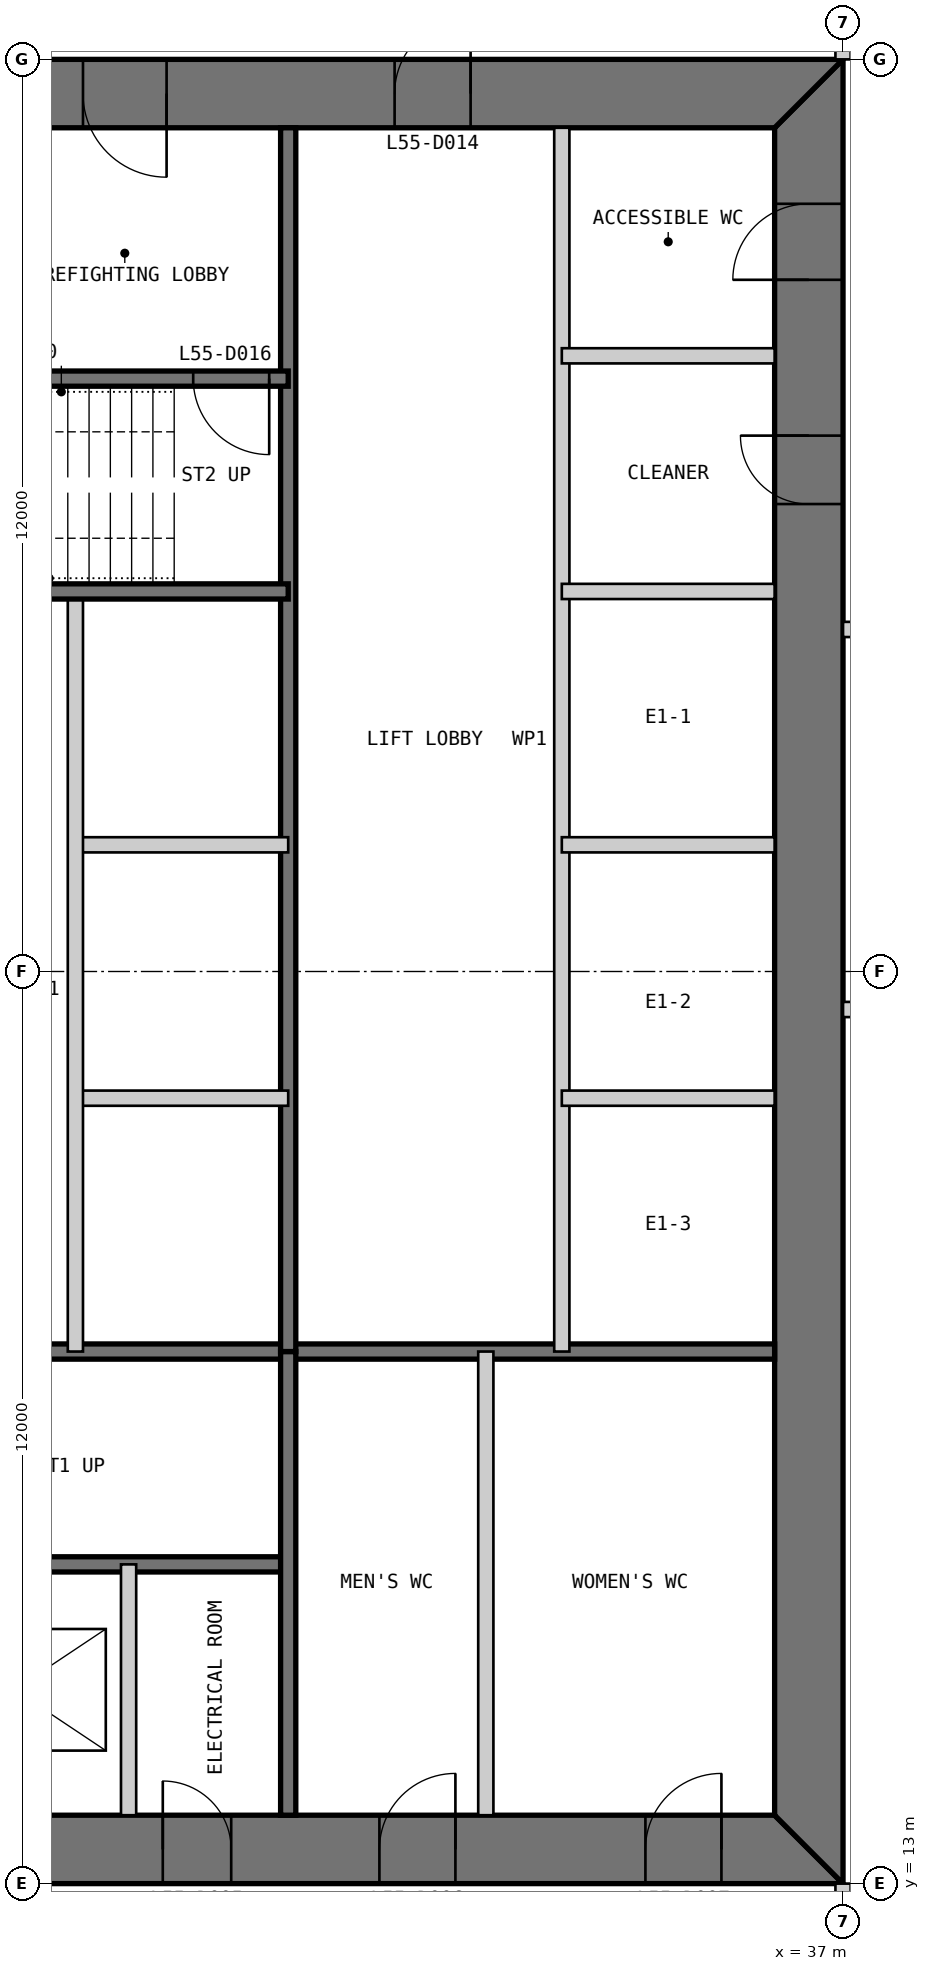
"""IFC4 building model, lengths in metres.
Left out: names, types, materials, properties, quantities, classifications, styles, units other than length and angle.
Written with IfcOpenShell. Run it as: python <this file> out.ifc"""

import sys

from ifc_helpers import new_model, si_unit, direction, frame, frame_2d, origin, place, context, subcontext, project, spatial, polyline, rectangle, outline, extrude, element, fill, save


model = new_model("IFC4")
c1 = context("Model", 3, precision=1e-05, world=origin(), true_north=direction((0.0, 1.0)))
c2 = subcontext(c1, "Body", "Model", "MODEL_VIEW")
j1 = project(units=[si_unit("LENGTHUNIT", "METRE"), si_unit("PLANEANGLEUNIT", "RADIAN")], contexts=[c1])
p1 = place(None, origin())
s1 = spatial("IfcSite", under=j1, at=p1, CompositionType="ELEMENT")
p2 = place(p1, origin())
s2 = spatial("IfcBuilding", under=s1, at=p2, CompositionType="ELEMENT")
p3 = place(p2, frame((0.0, 0.0, 233.8)))
s3 = spatial("IfcBuildingStorey", under=s2, at=p3, CompositionType="ELEMENT", Elevation=233.8)
p4 = place(p3, frame((13.0, 13.45, 0.0), z_axis=(0.0, 0.0, 1.0), x_axis=(1.0, 0.0, 0.0)))
e1 = element("IfcWall", 1, at=p4, inside=s3, PredefinedType="SHEAR", context=c2, shape_type="SweptSolid", body=[
    extrude(outline(polyline([(0.0, -0.45), (24.0, -0.45), (23.1, 0.45), (0.9, 0.45), (0.0, -0.45)])), origin(), (0.0, 0.0, 1.0), 6.0),
])
p5 = place(p4, frame((4.9, 0.0, 0.0)))
e2 = element("IfcOpeningElement", 2, at=p5, cuts=e1, PredefinedType="OPENING", context=c2, shape_type="SweptSolid", body=[
    extrude(rectangle(XDim=1.0, YDim=2.2, at=frame_2d((0.5, 1.1))), frame((0.0, 0.46, 0.0), z_axis=(0.0, -1.0, 0.0), x_axis=(1.0, 0.0, 0.0)), (0.0, 0.0, 1.0), 0.92),
])
p6 = place(p4, frame((8.9, 0.0, 0.0)))
e3 = element("IfcOpeningElement", 3, at=p6, cuts=e1, PredefinedType="OPENING", context=c2, shape_type="SweptSolid", body=[
    extrude(rectangle(XDim=1.1, YDim=2.2, at=frame_2d((0.55, 1.1))), frame((0.0, 0.46, 0.0), z_axis=(0.0, -1.0, 0.0), x_axis=(1.0, 0.0, 0.0)), (0.0, 0.0, 1.0), 0.92),
])
p7 = place(p4, frame((15.05, 0.0, 0.0)))
e4 = element("IfcOpeningElement", 4, at=p7, cuts=e1, PredefinedType="OPENING", context=c2, shape_type="SweptSolid", body=[
    extrude(rectangle(XDim=0.9, YDim=2.2, at=frame_2d((0.45, 1.1))), frame((0.0, 0.46, 0.0), z_axis=(0.0, -1.0, 0.0), x_axis=(1.0, 0.0, 0.0)), (0.0, 0.0, 1.0), 0.92),
])
p8 = place(p4, frame((17.9, 0.0, 0.0)))
e5 = element("IfcOpeningElement", 5, at=p8, cuts=e1, PredefinedType="OPENING", context=c2, shape_type="SweptSolid", body=[
    extrude(rectangle(XDim=1.0, YDim=2.2, at=frame_2d((0.5, 1.1))), frame((0.0, 0.46, 0.0), z_axis=(0.0, -1.0, 0.0), x_axis=(1.0, 0.0, 0.0)), (0.0, 0.0, 1.0), 0.92),
])
p9 = place(p4, frame((21.4, 0.0, 0.0)))
e6 = element("IfcOpeningElement", 6, at=p9, cuts=e1, PredefinedType="OPENING", context=c2, shape_type="SweptSolid", body=[
    extrude(rectangle(XDim=1.0, YDim=2.2, at=frame_2d((0.5, 1.1))), frame((0.0, 0.46, 0.0), z_axis=(0.0, -1.0, 0.0), x_axis=(1.0, 0.0, 0.0)), (0.0, 0.0, 1.0), 0.92),
])
p10 = place(p3, frame((36.55, 13.9, 0.0), z_axis=(0.0, 0.0, 1.0), x_axis=(0.0, 1.0, 0.0)))
e7 = element("IfcWall", 7, at=p10, inside=s3, PredefinedType="SHEAR", context=c2, shape_type="SweptSolid", body=[
    extrude(outline(polyline([(-0.9, -0.45), (23.1, -0.45), (22.2, 0.45), (0.0, 0.45), (-0.9, -0.45)])), origin(), (0.0, 0.0, 1.0), 6.0),
])
p11 = place(p10, frame((20.2, 0.0, 0.0)))
e8 = element("IfcOpeningElement", 8, at=p11, cuts=e7, PredefinedType="OPENING", context=c2, shape_type="SweptSolid", body=[
    extrude(rectangle(XDim=1.0, YDim=2.2, at=frame_2d((0.5, 1.1))), frame((0.0, 0.46, 0.0), z_axis=(0.0, -1.0, 0.0), x_axis=(1.0, 0.0, 0.0)), (0.0, 0.0, 1.0), 0.92),
])
p12 = place(p10, frame((17.25, 0.0, 0.0)))
e9 = element("IfcOpeningElement", 9, at=p12, cuts=e7, PredefinedType="OPENING", context=c2, shape_type="SweptSolid", body=[
    extrude(rectangle(XDim=0.9, YDim=2.2, at=frame_2d((0.45, 1.1))), frame((0.0, 0.46, 0.0), z_axis=(0.0, -1.0, 0.0), x_axis=(1.0, 0.0, 0.0)), (0.0, 0.0, 1.0), 0.92),
])
p13 = place(p3, frame((37.0, 36.55, 0.0), z_axis=(0.0, 0.0, 1.0), x_axis=(-1.0, 0.0, 0.0)))
e10 = element("IfcWall", 10, at=p13, inside=s3, PredefinedType="SHEAR", context=c2, shape_type="SweptSolid", body=[
    extrude(outline(polyline([(0.0, -0.45), (24.0, -0.45), (23.1, 0.45), (0.9, 0.45), (0.0, -0.45)])), origin(), (0.0, 0.0, 1.0), 6.0),
])
p14 = place(p13, frame((4.9, 0.0, 0.0)))
e11 = element("IfcOpeningElement", 11, at=p14, cuts=e10, PredefinedType="OPENING", context=c2, shape_type="SweptSolid", body=[
    extrude(rectangle(XDim=1.0, YDim=2.2, at=frame_2d((0.5, 1.1))), frame((0.0, 0.46, 0.0), z_axis=(0.0, -1.0, 0.0), x_axis=(1.0, 0.0, 0.0)), (0.0, 0.0, 1.0), 0.92),
])
p15 = place(p13, frame((8.9, 0.0, 0.0)))
e12 = element("IfcOpeningElement", 12, at=p15, cuts=e10, PredefinedType="OPENING", context=c2, shape_type="SweptSolid", body=[
    extrude(rectangle(XDim=1.1, YDim=2.2, at=frame_2d((0.55, 1.1))), frame((0.0, 0.46, 0.0), z_axis=(0.0, -1.0, 0.0), x_axis=(1.0, 0.0, 0.0)), (0.0, 0.0, 1.0), 0.92),
])
p16 = place(p13, frame((15.05, 0.0, 0.0)))
e13 = element("IfcOpeningElement", 13, at=p16, cuts=e10, PredefinedType="OPENING", context=c2, shape_type="SweptSolid", body=[
    extrude(rectangle(XDim=0.9, YDim=2.2, at=frame_2d((0.45, 1.1))), frame((0.0, 0.46, 0.0), z_axis=(0.0, -1.0, 0.0), x_axis=(1.0, 0.0, 0.0)), (0.0, 0.0, 1.0), 0.92),
])
p17 = place(p13, frame((17.9, 0.0, 0.0)))
e14 = element("IfcOpeningElement", 14, at=p17, cuts=e10, PredefinedType="OPENING", context=c2, shape_type="SweptSolid", body=[
    extrude(rectangle(XDim=1.0, YDim=2.2, at=frame_2d((0.5, 1.1))), frame((0.0, 0.46, 0.0), z_axis=(0.0, -1.0, 0.0), x_axis=(1.0, 0.0, 0.0)), (0.0, 0.0, 1.0), 0.92),
])
p18 = place(p13, frame((21.4, 0.0, 0.0)))
e15 = element("IfcOpeningElement", 15, at=p18, cuts=e10, PredefinedType="OPENING", context=c2, shape_type="SweptSolid", body=[
    extrude(rectangle(XDim=1.0, YDim=2.2, at=frame_2d((0.5, 1.1))), frame((0.0, 0.46, 0.0), z_axis=(0.0, -1.0, 0.0), x_axis=(1.0, 0.0, 0.0)), (0.0, 0.0, 1.0), 0.92),
])
p19 = place(p3, frame((20.3, 17.2, 0.0), z_axis=(0.0, 0.0, 1.0), x_axis=(1.0, 0.0, 0.0)))
e16 = element("IfcWall", 16, at=p19, inside=s3, PredefinedType="SOLIDWALL", context=c2, shape_type="SweptSolid", body=[
    extrude(rectangle(XDim=9.4, YDim=0.2, at=frame_2d((4.7, 0.0))), origin(), (0.0, 0.0, 1.0), 5.8),
])
p20 = place(p19, frame((0.25, 0.0, 0.0)))
e17 = element("IfcOpeningElement", 17, at=p20, cuts=e16, PredefinedType="OPENING", context=c2, shape_type="SweptSolid", body=[
    extrude(rectangle(XDim=1.0, YDim=2.2, at=frame_2d((0.5, 1.1))), frame((0.0, 0.11, 0.0), z_axis=(0.0, -1.0, 0.0), x_axis=(1.0, 0.0, 0.0)), (0.0, 0.0, 1.0), 0.22),
])
p21 = place(p3, frame((20.3, 20.0, 0.0), z_axis=(0.0, 0.0, 1.0), x_axis=(1.0, 0.0, 0.0)))
e18 = element("IfcWall", 18, at=p21, inside=s3, PredefinedType="SOLIDWALL", context=c2, shape_type="SweptSolid", body=[
    extrude(rectangle(XDim=15.8, YDim=0.2, at=frame_2d((7.9, 0.0))), origin(), (0.0, 0.0, 1.0), 5.8),
])
p22 = place(p3, frame((27.6, 13.9, 0.0), z_axis=(0.0, 0.0, 1.0), x_axis=(0.0, 1.0, 0.0)))
e19 = element("IfcWall", 19, at=p22, inside=s3, PredefinedType="PARTITIONING", context=c2, shape_type="SweptSolid", body=[
    extrude(rectangle(XDim=3.3, YDim=0.2, at=frame_2d((1.65, 0.0))), origin(), (0.0, 0.0, 1.0), 5.8),
])
p23 = place(p3, frame((29.7, 13.9, 0.0), z_axis=(0.0, 0.0, 1.0), x_axis=(0.0, 1.0, 0.0)))
e20 = element("IfcWall", 20, at=p23, inside=s3, PredefinedType="SOLIDWALL", context=c2, shape_type="SweptSolid", body=[
    extrude(rectangle(XDim=6.1, YDim=0.2, at=frame_2d((3.05, 0.0))), origin(), (0.0, 0.0, 1.0), 5.8),
])
p24 = place(p3, frame((32.3, 13.9, 0.0), z_axis=(0.0, 0.0, 1.0), x_axis=(0.0, 1.0, 0.0)))
e21 = element("IfcWall", 21, at=p24, inside=s3, PredefinedType="PARTITIONING", context=c2, shape_type="SweptSolid", body=[
    extrude(rectangle(XDim=6.1, YDim=0.2, at=frame_2d((3.05, 0.0))), origin(), (0.0, 0.0, 1.0), 5.8),
])
p25 = place(p3, frame((33.3, 36.1, 0.0), z_axis=(0.0, 0.0, 1.0), x_axis=(0.0, -1.0, 0.0)))
e22 = element("IfcWall", 22, at=p25, inside=s3, PredefinedType="PARTITIONING", context=c2, shape_type="SweptSolid", body=[
    extrude(rectangle(XDim=16.1, YDim=0.2, at=frame_2d((8.05, 0.0))), origin(), (0.0, 0.0, 1.0), 5.8),
])
p26 = place(p3, frame((29.7, 36.1, 0.0), z_axis=(0.0, 0.0, 1.0), x_axis=(0.0, -1.0, 0.0)))
e23 = element("IfcWall", 23, at=p26, inside=s3, PredefinedType="SOLIDWALL", context=c2, shape_type="SweptSolid", body=[
    extrude(rectangle(XDim=16.1, YDim=0.2, at=frame_2d((8.05, 0.0))), origin(), (0.0, 0.0, 1.0), 5.8),
])
for number, where, z_axis, x_axis in (
    (24, (36.1, 30.0, 0.0), (0.0, 0.0, 1.0), (-1.0, 0.0, 0.0)),
    (25, (36.1, 26.667, 0.0), (0.0, 0.0, 1.0), (-1.0, 0.0, 0.0)),
    (26, (36.1, 23.333, 0.0), (0.0, 0.0, 1.0), (-1.0, 0.0, 0.0)),
    (27, (29.7, 26.667, 0.0), (0.0, 0.0, 1.0), (-1.0, 0.0, 0.0)),
    (28, (29.7, 23.333, 0.0), (0.0, 0.0, 1.0), (-1.0, 0.0, 0.0)),
):
    element("IfcWall", number, at=place(p3, frame(where, z_axis=z_axis, x_axis=x_axis)), inside=s3, PredefinedType="PARTITIONING", context=c2, shape_type="SweptSolid", body=[
        extrude(rectangle(XDim=2.8, YDim=0.2, at=frame_2d((1.4, 0.0))), origin(), (0.0, 0.0, 1.0), 5.8),
    ])
p27 = place(p3, frame((26.9, 30.0, 0.0), z_axis=(0.0, 0.0, 1.0), x_axis=(0.0, -1.0, 0.0)))
e29 = element("IfcWall", 29, at=p27, inside=s3, PredefinedType="PARTITIONING", context=c2, shape_type="SweptSolid", body=[
    extrude(rectangle(XDim=10.0, YDim=0.2, at=frame_2d((5.0, 0.0))), origin(), (0.0, 0.0, 1.0), 5.8),
])
p28 = place(p3, frame((29.7, 32.8, 0.0), z_axis=(0.0, 0.0, 1.0), x_axis=(-1.0, 0.0, 0.0)))
e30 = element("IfcWall", 30, at=p28, inside=s3, PredefinedType="SOLIDWALL", context=c2, shape_type="SweptSolid", body=[
    extrude(rectangle(XDim=9.4, YDim=0.2, at=frame_2d((4.7, 0.0))), origin(), (0.0, 0.0, 1.0), 5.8),
])
p29 = place(p28, frame((0.25, 0.0, 0.0)))
e31 = element("IfcOpeningElement", 31, at=p29, cuts=e30, PredefinedType="OPENING", context=c2, shape_type="SweptSolid", body=[
    extrude(rectangle(XDim=1.0, YDim=2.2, at=frame_2d((0.5, 1.1))), frame((0.0, 0.11, 0.0), z_axis=(0.0, -1.0, 0.0), x_axis=(1.0, 0.0, 0.0)), (0.0, 0.0, 1.0), 0.22),
])
p30 = place(p3, frame((29.7, 30.0, 0.0), z_axis=(0.0, 0.0, 1.0), x_axis=(-1.0, 0.0, 0.0)))
e32 = element("IfcWall", 32, at=p30, inside=s3, PredefinedType="SOLIDWALL", context=c2, shape_type="SweptSolid", body=[
    extrude(rectangle(XDim=15.8, YDim=0.2, at=frame_2d((7.9, 0.0))), origin(), (0.0, 0.0, 1.0), 5.8),
])
p31 = place(p3, frame((36.1, 33.1, 0.0), z_axis=(0.0, 0.0, 1.0), x_axis=(-1.0, 0.0, 0.0)))
e33 = element("IfcWall", 33, at=p31, inside=s3, PredefinedType="PARTITIONING", context=c2, shape_type="SweptSolid", body=[
    extrude(rectangle(XDim=2.8, YDim=0.2, at=frame_2d((1.4, 0.0))), origin(), (0.0, 0.0, 1.0), 5.8),
])
p32 = place(p3, frame((37.0, 42.5, 0.0), z_axis=(0.0, 0.0, 1.0), x_axis=(0.0, -1.0, 0.0)))
e34 = element("IfcWall", 34, at=p32, inside=s3, PredefinedType="PARTITIONING", context=c2, shape_type="SweptSolid", body=[
    extrude(rectangle(XDim=5.5, YDim=0.2, at=frame_2d((2.75, 0.0))), origin(), (0.0, 0.0, 1.0), 4.705),
])
p33 = place(p3, frame((37.0, 10.6, 0.0), z_axis=(0.0, 0.0, 1.0), x_axis=(0.0, 1.0, 0.0)))
e35 = element("IfcWall", 35, at=p33, inside=s3, PredefinedType="PARTITIONING", context=c2, shape_type="SweptSolid", body=[
    extrude(rectangle(XDim=2.4, YDim=0.2, at=frame_2d((1.2, 0.0))), origin(), (0.0, 0.0, 1.0), 4.705),
])
p34 = place(p3, frame((37.0, 24.5, 0.0), z_axis=(0.0, 0.0, 1.0), x_axis=(1.0, 0.0, 0.0)))
e36 = element("IfcWall", 36, at=p34, inside=s3, PredefinedType="PARTITIONING", context=c2, shape_type="SweptSolid", body=[
    extrude(rectangle(XDim=11.0, YDim=0.2, at=frame_2d((5.5, 0.0))), origin(), (0.0, 0.0, 1.0), 5.8),
])
p35 = place(p34, frame((4.6, 0.0, 0.0)))
e37 = element("IfcOpeningElement", 37, at=p35, cuts=e36, PredefinedType="OPENING", context=c2, shape_type="SweptSolid", body=[
    extrude(rectangle(XDim=1.8, YDim=2.4, at=frame_2d((0.9, 1.2))), frame((0.0, 0.11, 0.0), z_axis=(0.0, -1.0, 0.0), x_axis=(1.0, 0.0, 0.0)), (0.0, 0.0, 1.0), 0.22),
])
p36 = place(p3, frame((37.0, 29.5, 0.0), z_axis=(0.0, 0.0, 1.0), x_axis=(1.0, 0.0, 0.0)))
e38 = element("IfcWall", 38, at=p36, inside=s3, PredefinedType="PARTITIONING", context=c2, shape_type="SweptSolid", body=[
    extrude(rectangle(XDim=11.0, YDim=0.2, at=frame_2d((5.5, 0.0))), origin(), (0.0, 0.0, 1.0), 5.8),
])
p37 = place(p36, frame((4.6, 0.0, 0.0)))
e39 = element("IfcOpeningElement", 39, at=p37, cuts=e38, PredefinedType="OPENING", context=c2, shape_type="SweptSolid", body=[
    extrude(rectangle(XDim=1.8, YDim=2.4, at=frame_2d((0.9, 1.2))), frame((0.0, 0.11, 0.0), z_axis=(0.0, -1.0, 0.0), x_axis=(1.0, 0.0, 0.0)), (0.0, 0.0, 1.0), 0.22),
])
p38 = place(p7, origin())
e40 = element("IfcDoor", 40, at=p38, inside=s3, OperationType="SINGLE_SWING_LEFT", PredefinedType="DOOR", context=c2, shape_type="SweptSolid", body=[
    extrude(rectangle(XDim=0.9, YDim=2.2, at=frame_2d((0.45, 1.1))), frame((0.0, 0.025, 0.0), z_axis=(0.0, -1.0, 0.0), x_axis=(1.0, 0.0, 0.0)), (0.0, 0.0, 1.0), 0.05),
    extrude(outline(polyline([(0.0, 0.0), (0.04, 0.0), (0.04, 2.16), (0.86, 2.16), (0.86, 0.0), (0.9, 0.0), (0.9, 2.2), (0.0, 2.2), (0.0, 0.0)])), frame((0.0, 0.3, 0.0), z_axis=(0.0, -1.0, 0.0), x_axis=(1.0, 0.0, 0.0)), (0.0, 0.0, 1.0), 0.6),
])
fill(e4, e40)
p39 = place(p8, origin())
e41 = element("IfcDoor", 41, at=p39, inside=s3, OperationType="SINGLE_SWING_RIGHT", PredefinedType="DOOR", context=c2, shape_type="SweptSolid", body=[
    extrude(rectangle(XDim=1.0, YDim=2.2, at=frame_2d((0.5, 1.1))), frame((0.0, 0.025, 0.0), z_axis=(0.0, -1.0, 0.0), x_axis=(1.0, 0.0, 0.0)), (0.0, 0.0, 1.0), 0.05),
    extrude(outline(polyline([(0.0, 0.0), (0.04, 0.0), (0.04, 2.16), (0.96, 2.16), (0.96, 0.0), (1.0, 0.0), (1.0, 2.2), (0.0, 2.2), (0.0, 0.0)])), frame((0.0, 0.3, 0.0), z_axis=(0.0, -1.0, 0.0), x_axis=(1.0, 0.0, 0.0)), (0.0, 0.0, 1.0), 0.6),
])
fill(e5, e41)
p40 = place(p9, origin())
e42 = element("IfcDoor", 42, at=p40, inside=s3, OperationType="SINGLE_SWING_RIGHT", PredefinedType="DOOR", context=c2, shape_type="SweptSolid", body=[
    extrude(rectangle(XDim=1.0, YDim=2.2, at=frame_2d((0.5, 1.1))), frame((0.0, 0.025, 0.0), z_axis=(0.0, -1.0, 0.0), x_axis=(1.0, 0.0, 0.0)), (0.0, 0.0, 1.0), 0.05),
    extrude(outline(polyline([(0.0, 0.0), (0.04, 0.0), (0.04, 2.16), (0.96, 2.16), (0.96, 0.0), (1.0, 0.0), (1.0, 2.2), (0.0, 2.2), (0.0, 0.0)])), frame((0.0, 0.3, 0.0), z_axis=(0.0, -1.0, 0.0), x_axis=(1.0, 0.0, 0.0)), (0.0, 0.0, 1.0), 0.6),
])
fill(e6, e42)
p41 = place(p14, frame((1.0, 0.0, 0.0), z_axis=(0.0, 0.0, 1.0), x_axis=(-1.0, 0.0, 0.0)))
e43 = element("IfcDoor", 43, at=p41, inside=s3, OperationType="SINGLE_SWING_RIGHT", PredefinedType="DOOR", context=c2, shape_type="SweptSolid", body=[
    extrude(rectangle(XDim=1.0, YDim=2.2, at=frame_2d((0.5, 1.1))), frame((0.0, 0.025, 0.0), z_axis=(0.0, -1.0, 0.0), x_axis=(1.0, 0.0, 0.0)), (0.0, 0.0, 1.0), 0.05),
    extrude(outline(polyline([(0.0, 0.0), (0.04, 0.0), (0.04, 2.16), (0.96, 2.16), (0.96, 0.0), (1.0, 0.0), (1.0, 2.2), (0.0, 2.2), (0.0, 0.0)])), frame((0.0, 0.3, 0.0), z_axis=(0.0, -1.0, 0.0), x_axis=(1.0, 0.0, 0.0)), (0.0, 0.0, 1.0), 0.6),
])
fill(e11, e43)
p42 = place(p15, origin())
e44 = element("IfcDoor", 44, at=p42, inside=s3, OperationType="SINGLE_SWING_LEFT", PredefinedType="DOOR", context=c2, shape_type="SweptSolid", body=[
    extrude(rectangle(XDim=1.1, YDim=2.2, at=frame_2d((0.55, 1.1))), frame((0.0, 0.025, 0.0), z_axis=(0.0, -1.0, 0.0), x_axis=(1.0, 0.0, 0.0)), (0.0, 0.0, 1.0), 0.05),
    extrude(outline(polyline([(0.0, 0.0), (0.04, 0.0), (0.04, 2.16), (1.06, 2.16), (1.06, 0.0), (1.1, 0.0), (1.1, 2.2), (0.0, 2.2), (0.0, 0.0)])), frame((0.0, 0.3, 0.0), z_axis=(0.0, -1.0, 0.0), x_axis=(1.0, 0.0, 0.0)), (0.0, 0.0, 1.0), 0.6),
])
fill(e12, e44)
p43 = place(p29, origin())
e45 = element("IfcDoor", 45, at=p43, inside=s3, OperationType="SINGLE_SWING_LEFT", PredefinedType="DOOR", context=c2, shape_type="SweptSolid", body=[
    extrude(rectangle(XDim=1.0, YDim=2.2, at=frame_2d((0.5, 1.1))), frame((0.0, 0.025, 0.0), z_axis=(0.0, -1.0, 0.0), x_axis=(1.0, 0.0, 0.0)), (0.0, 0.0, 1.0), 0.05),
])
fill(e31, e45)
p44 = place(p11, origin())
e46 = element("IfcDoor", 46, at=p44, inside=s3, OperationType="SINGLE_SWING_LEFT", PredefinedType="DOOR", context=c2, shape_type="SweptSolid", body=[
    extrude(rectangle(XDim=1.0, YDim=2.2, at=frame_2d((0.5, 1.1))), frame((0.0, 0.025, 0.0), z_axis=(0.0, -1.0, 0.0), x_axis=(1.0, 0.0, 0.0)), (0.0, 0.0, 1.0), 0.05),
    extrude(outline(polyline([(0.0, 0.0), (0.04, 0.0), (0.04, 2.16), (0.96, 2.16), (0.96, 0.0), (1.0, 0.0), (1.0, 2.2), (0.0, 2.2), (0.0, 0.0)])), frame((0.0, 0.3, 0.0), z_axis=(0.0, -1.0, 0.0), x_axis=(1.0, 0.0, 0.0)), (0.0, 0.0, 1.0), 0.6),
])
fill(e8, e46)
p45 = place(p12, origin())
e47 = element("IfcDoor", 47, at=p45, inside=s3, OperationType="SINGLE_SWING_RIGHT", PredefinedType="DOOR", context=c2, shape_type="SweptSolid", body=[
    extrude(rectangle(XDim=0.9, YDim=2.2, at=frame_2d((0.45, 1.1))), frame((0.0, 0.025, 0.0), z_axis=(0.0, -1.0, 0.0), x_axis=(1.0, 0.0, 0.0)), (0.0, 0.0, 1.0), 0.05),
    extrude(outline(polyline([(0.0, 0.0), (0.04, 0.0), (0.04, 2.16), (0.86, 2.16), (0.86, 0.0), (0.9, 0.0), (0.9, 2.2), (0.0, 2.2), (0.0, 0.0)])), frame((0.0, 0.3, 0.0), z_axis=(0.0, -1.0, 0.0), x_axis=(1.0, 0.0, 0.0)), (0.0, 0.0, 1.0), 0.6),
])
fill(e9, e47)
save(model, sys.argv[1])
